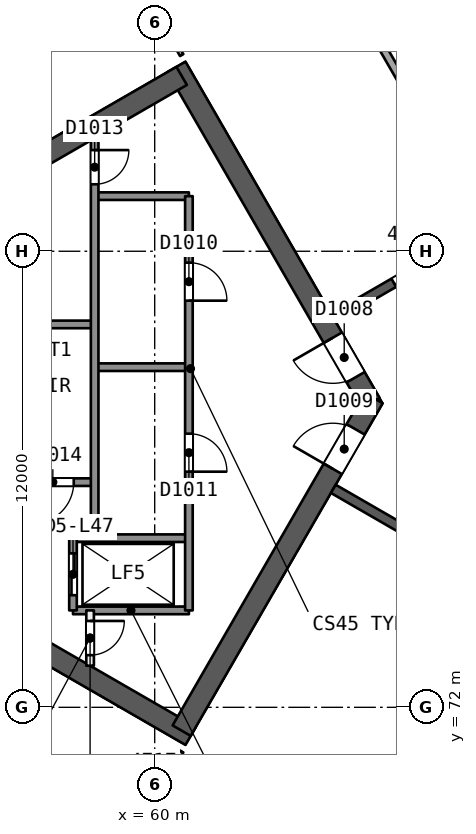
"""IFC4 building model, lengths in metres.
Left out: names, types, materials, properties, quantities, classifications, styles, units other than length and angle.
Written with IfcOpenShell. Run it as: python <this file> out.ifc"""

import sys

from ifc_helpers import new_model, si_unit, direction, frame, frame_2d, origin, place, context, subcontext, project, spatial, rectangle, extrude, element, fill, save


model = new_model("IFC4")
c1 = context("Model", 3, precision=1e-05, world=origin(), true_north=direction((0.0, 1.0)))
c2 = subcontext(c1, "Body", "Model", "MODEL_VIEW")
j1 = project(units=[si_unit("LENGTHUNIT", "METRE"), si_unit("PLANEANGLEUNIT", "RADIAN")], contexts=[c1])
p1 = place(None, origin())
s1 = spatial("IfcSite", under=j1, at=p1, CompositionType="ELEMENT")
p2 = place(p1, origin())
s2 = spatial("IfcBuilding", under=s1, at=p2, CompositionType="ELEMENT")
p3 = place(p2, frame((0.0, 0.0, 193.3)))
s3 = spatial("IfcBuildingStorey", under=s2, at=p3, CompositionType="ELEMENT", Elevation=193.3)
p4 = place(p3, frame((65.682, 80.0, 0.0), z_axis=(0.0, 0.0, 1.0), x_axis=(-0.500000202252, 0.866025287014, 0.0)))
e1 = element("IfcWall", 1, at=p4, inside=s3, PredefinedType="SHEAR", context=c2, shape_type="SweptSolid", body=[
    extrude(rectangle(XDim=10.221, YDim=0.55, at=frame_2d((5.111, 0.0))), origin(), (0.0, 0.0, 1.0), 3.7),
])
p5 = place(p4, frame((0.791, 0.0, 0.0)))
e2 = element("IfcOpeningElement", 2, at=p5, cuts=e1, PredefinedType="OPENING", context=c2, shape_type="SweptSolid", body=[
    extrude(rectangle(XDim=1.2, YDim=2.1, at=frame_2d((0.6, 1.05))), frame((0.0, 0.286, 0.0), z_axis=(0.0, -1.0, 0.0), x_axis=(1.0, 0.0, 0.0)), (0.0, 0.0, 1.0), 0.571),
])
p6 = place(p3, frame((60.709, 88.614, 0.0), z_axis=(0.0, 0.0, 1.0), x_axis=(-0.866020164116, -0.500009075263, 0.0)))
e3 = element("IfcWall", 3, at=p6, inside=s3, PredefinedType="SHEAR", context=c2, shape_type="SweptSolid", body=[
    extrude(rectangle(XDim=14.058, YDim=0.55, at=frame_2d((7.029, 0.0))), origin(), (0.0, 0.0, 1.0), 3.7),
])
p7 = place(p3, frame((48.672, 78.336, 0.0), z_axis=(0.0, 0.0, 1.0), x_axis=(0.866023530946, -0.500003243837, 0.0)))
e4 = element("IfcWall", 4, at=p7, inside=s3, PredefinedType="SHEAR", context=c2, shape_type="SweptSolid", body=[
    extrude(rectangle(XDim=14.175, YDim=0.55, at=frame_2d((7.087, 0.0))), origin(), (0.0, 0.0, 1.0), 3.7),
])
p8 = place(p3, frame((60.709, 71.386, 0.0), z_axis=(0.0, 0.0, 1.0), x_axis=(0.500015938302, 0.866016201606, 0.0)))
e5 = element("IfcWall", 5, at=p8, inside=s3, PredefinedType="SHEAR", context=c2, shape_type="SweptSolid", body=[
    extrude(rectangle(XDim=10.105, YDim=0.55, at=frame_2d((5.053, 0.0))), origin(), (0.0, 0.0, 1.0), 3.7),
])
p9 = place(p8, frame((7.955, 0.0, 0.0)))
e6 = element("IfcOpeningElement", 6, at=p9, cuts=e5, PredefinedType="OPENING", context=c2, shape_type="SweptSolid", body=[
    extrude(rectangle(XDim=1.2, YDim=2.1, at=frame_2d((0.6, 1.05))), frame((0.0, 0.286, 0.0), z_axis=(0.0, -1.0, 0.0), x_axis=(1.0, 0.0, 0.0)), (0.0, 0.0, 1.0), 0.571),
])
p10 = place(p3, frame((78.2, 90.046, 0.0), z_axis=(0.0, 0.0, 1.0), x_axis=(-0.866026492143, -0.499998114903, 0.0)))
e7 = element("IfcWall", 7, at=p10, inside=s3, PredefinedType="SHEAR", context=c2, shape_type="SweptSolid", body=[
    extrude(rectangle(XDim=15.588, YDim=0.25, at=frame_2d((7.794, 0.0))), origin(), (0.0, 0.0, 1.0), 3.3),
])
p11 = place(p10, frame((1.059, 0.0, 0.0)))
e8 = element("IfcOpeningElement", 8, at=p11, cuts=e7, PredefinedType="OPENING", context=c2, shape_type="SweptSolid", body=[
    extrude(rectangle(XDim=1.0, YDim=2.1, at=frame_2d((0.5, 1.05))), frame((0.0, 0.135, 0.0), z_axis=(0.0, -1.0, 0.0), x_axis=(1.0, 0.0, 0.0)), (0.0, 0.0, 1.0), 0.271),
])
p12 = place(p10, frame((4.616, 0.0, 0.0)))
e9 = element("IfcOpeningElement", 9, at=p12, cuts=e7, PredefinedType="OPENING", context=c2, shape_type="SweptSolid", body=[
    extrude(rectangle(XDim=0.9, YDim=2.1, at=frame_2d((0.45, 1.05))), frame((0.0, 0.135, 0.0), z_axis=(0.0, -1.0, 0.0), x_axis=(1.0, 0.0, 0.0)), (0.0, 0.0, 1.0), 0.271),
])
p13 = place(p10, frame((8.513, 0.0, 0.0)))
e10 = element("IfcOpeningElement", 10, at=p13, cuts=e7, PredefinedType="OPENING", context=c2, shape_type="SweptSolid", body=[
    extrude(rectangle(XDim=0.9, YDim=2.1, at=frame_2d((0.45, 1.05))), frame((0.0, 0.135, 0.0), z_axis=(0.0, -1.0, 0.0), x_axis=(1.0, 0.0, 0.0)), (0.0, 0.0, 1.0), 0.271),
])
p14 = place(p10, frame((12.75, 0.0, 0.0)))
e11 = element("IfcOpeningElement", 11, at=p14, cuts=e7, PredefinedType="OPENING", context=c2, shape_type="SweptSolid", body=[
    extrude(rectangle(XDim=1.0, YDim=2.1, at=frame_2d((0.5, 1.05))), frame((0.0, 0.135, 0.0), z_axis=(0.0, -1.0, 0.0), x_axis=(1.0, 0.0, 0.0)), (0.0, 0.0, 1.0), 0.271),
])
p15 = place(p3, frame((64.7, 77.748, 0.0), z_axis=(0.0, 0.0, 1.0), x_axis=(0.866026492143, -0.499998114903, 0.0)))
e12 = element("IfcWall", 12, at=p15, inside=s3, PredefinedType="SHEAR", context=c2, shape_type="SweptSolid", body=[
    extrude(rectangle(XDim=15.588, YDim=0.25, at=frame_2d((7.794, 0.0))), origin(), (0.0, 0.0, 1.0), 3.3),
])
p16 = place(p15, frame((3.007, 0.0, 0.0)))
e13 = element("IfcOpeningElement", 13, at=p16, cuts=e12, PredefinedType="OPENING", context=c2, shape_type="SweptSolid", body=[
    extrude(rectangle(XDim=1.0, YDim=2.1, at=frame_2d((0.5, 1.05))), frame((0.0, 0.135, 0.0), z_axis=(0.0, -1.0, 0.0), x_axis=(1.0, 0.0, 0.0)), (0.0, 0.0, 1.0), 0.271),
])
p17 = place(p15, frame((8.363, 0.0, 0.0)))
e14 = element("IfcOpeningElement", 14, at=p17, cuts=e12, PredefinedType="OPENING", context=c2, shape_type="SweptSolid", body=[
    extrude(rectangle(XDim=1.2, YDim=2.4, at=frame_2d((0.6, 1.2))), frame((0.0, 0.135, 0.0), z_axis=(0.0, -1.0, 0.0), x_axis=(1.0, 0.0, 0.0)), (0.0, 0.0, 1.0), 0.271),
])
p18 = place(p15, frame((12.75, 0.0, 0.0)))
e15 = element("IfcOpeningElement", 15, at=p18, cuts=e12, PredefinedType="OPENING", context=c2, shape_type="SweptSolid", body=[
    extrude(rectangle(XDim=1.0, YDim=2.1, at=frame_2d((0.5, 1.05))), frame((0.0, 0.135, 0.0), z_axis=(0.0, -1.0, 0.0), x_axis=(1.0, 0.0, 0.0)), (0.0, 0.0, 1.0), 0.271),
])
p19 = place(p3, frame((63.273, 94.076, 0.0), z_axis=(0.0, 0.0, 1.0), x_axis=(0.499998338299, -0.866026363166, 0.0)))
e16 = element("IfcWall", 16, at=p19, inside=s3, PredefinedType="PARTITIONING", context=c2, shape_type="SweptSolid", body=[
    extrude(rectangle(XDim=10.954, YDim=0.2, at=frame_2d((5.477, 0.0))), origin(), (0.0, 0.0, 1.0), 3.3),
])
p20 = place(p3, frame((59.223, 91.738, 0.0), z_axis=(0.0, 0.0, 1.0), x_axis=(0.49997816789, -0.866038008192, 0.0)))
e17 = element("IfcWall", 17, at=p20, inside=s3, PredefinedType="PARTITIONING", context=c2, shape_type="SweptSolid", body=[
    extrude(rectangle(XDim=2.975, YDim=0.1, at=frame_2d((1.488, 0.0))), origin(), (0.0, 0.0, 1.0), 3.3),
])
p21 = place(p20, frame((1.038, 0.0, 0.0)))
e18 = element("IfcOpeningElement", 18, at=p21, cuts=e17, PredefinedType="OPENING", context=c2, shape_type="SweptSolid", body=[
    extrude(rectangle(XDim=0.9, YDim=2.1, at=frame_2d((0.45, 1.05))), frame((0.0, 0.061, 0.0), z_axis=(0.0, -1.0, 0.0), x_axis=(1.0, 0.0, 0.0)), (0.0, 0.0, 1.0), 0.121),
])
p22 = place(p3, frame((60.71, 70.838, 0.0), z_axis=(0.0, 0.0, 1.0), x_axis=(-0.49997816789, -0.866038008192, 0.0)))
e19 = element("IfcWall", 19, at=p22, inside=s3, PredefinedType="PARTITIONING", context=c2, shape_type="SweptSolid", body=[
    extrude(rectangle(XDim=2.975, YDim=0.1, at=frame_2d((1.488, 0.0))), origin(), (0.0, 0.0, 1.0), 3.3),
])
p23 = place(p22, frame((1.038, 0.0, 0.0)))
e20 = element("IfcOpeningElement", 20, at=p23, cuts=e19, PredefinedType="OPENING", context=c2, shape_type="SweptSolid", body=[
    extrude(rectangle(XDim=0.9, YDim=2.1, at=frame_2d((0.45, 1.05))), frame((0.0, 0.061, 0.0), z_axis=(0.0, -1.0, 0.0), x_axis=(1.0, 0.0, 0.0)), (0.0, 0.0, 1.0), 0.121),
])
p24 = place(p3, frame((65.298, 64.754, 0.0), z_axis=(0.0, 0.0, 1.0), x_axis=(0.499998338299, 0.866026363166, 0.0)))
e21 = element("IfcWall", 21, at=p24, inside=s3, PredefinedType="PARTITIONING", context=c2, shape_type="SweptSolid", body=[
    extrude(rectangle(XDim=10.954, YDim=0.2, at=frame_2d((5.477, 0.0))), origin(), (0.0, 0.0, 1.0), 3.3),
])
p25 = place(p3, frame((43.232, 82.678, 0.0), z_axis=(0.0, 0.0, 1.0), x_axis=(0.866025125259, 0.500000482419, 0.0)))
e22 = element("IfcWall", 22, at=p25, inside=s3, PredefinedType="SOLIDWALL", context=c2, shape_type="SweptSolid", body=[
    extrude(rectangle(XDim=52.347, YDim=0.3, at=frame_2d((26.173, 0.0))), origin(), (0.0, 0.0, 1.0), 3.3),
])
p26 = place(p25, frame((31.209, 0.0, 0.0)))
e23 = element("IfcOpeningElement", 23, at=p26, cuts=e22, PredefinedType="OPENING", context=c2, shape_type="SweptSolid", body=[
    extrude(rectangle(XDim=2.4, YDim=2.4, at=frame_2d((1.2, 1.2))), frame((0.0, 0.161, 0.0), z_axis=(0.0, -1.0, 0.0), x_axis=(1.0, 0.0, 0.0)), (0.0, 0.0, 1.0), 0.321),
])
p27 = place(p25, frame((40.7, 0.0, 0.0)))
e24 = element("IfcOpeningElement", 24, at=p27, cuts=e22, PredefinedType="OPENING", context=c2, shape_type="SweptSolid", body=[
    extrude(rectangle(XDim=2.4, YDim=2.4, at=frame_2d((1.2, 1.2))), frame((0.0, 0.161, 0.0), z_axis=(0.0, -1.0, 0.0), x_axis=(1.0, 0.0, 0.0)), (0.0, 0.0, 1.0), 0.321),
])
p28 = place(p25, frame((19.517, 0.0, 0.0)))
e25 = element("IfcOpeningElement", 25, at=p28, cuts=e22, PredefinedType="OPENING", context=c2, shape_type="SweptSolid", body=[
    extrude(rectangle(XDim=2.4, YDim=2.4, at=frame_2d((1.2, 1.2))), frame((0.0, 0.161, 0.0), z_axis=(0.0, -1.0, 0.0), x_axis=(1.0, 0.0, 0.0)), (0.0, 0.0, 1.0), 0.321),
])
p29 = place(p25, frame((9.27, 0.0, 0.0)))
e26 = element("IfcOpeningElement", 26, at=p29, cuts=e22, PredefinedType="OPENING", context=c2, shape_type="SweptSolid", body=[
    extrude(rectangle(XDim=2.4, YDim=2.4, at=frame_2d((1.2, 1.2))), frame((0.0, 0.161, 0.0), z_axis=(0.0, -1.0, 0.0), x_axis=(1.0, 0.0, 0.0)), (0.0, 0.0, 1.0), 0.321),
])
p30 = place(p25, frame((28.001, 0.0, 0.9)))
e27 = element("IfcOpeningElement", 27, at=p30, cuts=e22, PredefinedType="OPENING", context=c2, shape_type="SweptSolid", body=[
    extrude(rectangle(XDim=1.8, YDim=1.5, at=frame_2d((0.9, 0.75))), frame((0.0, 0.161, 0.0), z_axis=(0.0, -1.0, 0.0), x_axis=(1.0, 0.0, 0.0)), (0.0, 0.0, 1.0), 0.321),
])
p31 = place(p25, frame((24.104, 0.0, 0.9)))
e28 = element("IfcOpeningElement", 28, at=p31, cuts=e22, PredefinedType="OPENING", context=c2, shape_type="SweptSolid", body=[
    extrude(rectangle(XDim=1.8, YDim=1.5, at=frame_2d((0.9, 0.75))), frame((0.0, 0.161, 0.0), z_axis=(0.0, -1.0, 0.0), x_axis=(1.0, 0.0, 0.0)), (0.0, 0.0, 1.0), 0.321),
])
p32 = place(p3, frame((88.565, 51.149, 0.0), z_axis=(0.0, 0.0, 1.0), x_axis=(-0.866025125259, 0.500000482419, 0.0)))
e29 = element("IfcWall", 29, at=p32, inside=s3, PredefinedType="SOLIDWALL", context=c2, shape_type="SweptSolid", body=[
    extrude(rectangle(XDim=52.347, YDim=0.3, at=frame_2d((26.173, 0.0))), origin(), (0.0, 0.0, 1.0), 3.3),
])
p33 = place(p32, frame((29.26, 0.0, 0.0)))
e30 = element("IfcOpeningElement", 30, at=p33, cuts=e29, PredefinedType="OPENING", context=c2, shape_type="SweptSolid", body=[
    extrude(rectangle(XDim=2.4, YDim=2.4, at=frame_2d((1.2, 1.2))), frame((0.0, 0.161, 0.0), z_axis=(0.0, -1.0, 0.0), x_axis=(1.0, 0.0, 0.0)), (0.0, 0.0, 1.0), 0.321),
])
p34 = place(p32, frame((40.7, 0.0, 0.0)))
e31 = element("IfcOpeningElement", 31, at=p34, cuts=e29, PredefinedType="OPENING", context=c2, shape_type="SweptSolid", body=[
    extrude(rectangle(XDim=2.4, YDim=2.4, at=frame_2d((1.2, 1.2))), frame((0.0, 0.161, 0.0), z_axis=(0.0, -1.0, 0.0), x_axis=(1.0, 0.0, 0.0)), (0.0, 0.0, 1.0), 0.321),
])
p35 = place(p32, frame((19.517, 0.0, 0.0)))
e32 = element("IfcOpeningElement", 32, at=p35, cuts=e29, PredefinedType="OPENING", context=c2, shape_type="SweptSolid", body=[
    extrude(rectangle(XDim=2.4, YDim=2.4, at=frame_2d((1.2, 1.2))), frame((0.0, 0.161, 0.0), z_axis=(0.0, -1.0, 0.0), x_axis=(1.0, 0.0, 0.0)), (0.0, 0.0, 1.0), 0.321),
])
p36 = place(p32, frame((9.27, 0.0, 0.0)))
e33 = element("IfcOpeningElement", 33, at=p36, cuts=e29, PredefinedType="OPENING", context=c2, shape_type="SweptSolid", body=[
    extrude(rectangle(XDim=2.4, YDim=2.4, at=frame_2d((1.2, 1.2))), frame((0.0, 0.161, 0.0), z_axis=(0.0, -1.0, 0.0), x_axis=(1.0, 0.0, 0.0)), (0.0, 0.0, 1.0), 0.321),
])
p37 = place(p32, frame((24.104, 0.0, 0.9)))
e34 = element("IfcOpeningElement", 34, at=p37, cuts=e29, PredefinedType="OPENING", context=c2, shape_type="SweptSolid", body=[
    extrude(rectangle(XDim=1.8, YDim=1.5, at=frame_2d((0.9, 0.75))), frame((0.0, 0.161, 0.0), z_axis=(0.0, -1.0, 0.0), x_axis=(1.0, 0.0, 0.0)), (0.0, 0.0, 1.0), 0.321),
])
p38 = place(p3, frame((60.9, 85.45, 0.0), z_axis=(0.0, 0.0, 1.0), x_axis=(-1.0, 0.0, 0.0)))
e35 = element("IfcWall", 35, at=p38, inside=s3, PredefinedType="SOLIDWALL", context=c2, shape_type="SweptSolid", body=[
    extrude(rectangle(XDim=2.48, YDim=0.2, at=frame_2d((1.24, 0.0))), origin(), (0.0, 0.0, 1.0), 3.3),
])
p39 = place(p3, frame((58.42, 82.075, 0.0), z_axis=(0.0, 0.0, 1.0), x_axis=(-1.0, 0.0, 0.0)))
e36 = element("IfcWall", 36, at=p39, inside=s3, PredefinedType="SOLIDWALL", context=c2, shape_type="SweptSolid", body=[
    extrude(rectangle(XDim=7.7, YDim=0.2, at=frame_2d((3.85, 0.0))), origin(), (0.0, 0.0, 1.0), 3.3),
])
p40 = place(p3, frame((60.9, 80.95, 0.0), z_axis=(0.0, 0.0, 1.0), x_axis=(-1.0, 0.0, 0.0)))
e37 = element("IfcWall", 37, at=p40, inside=s3, PredefinedType="SOLIDWALL", context=c2, shape_type="SweptSolid", body=[
    extrude(rectangle(XDim=2.48, YDim=0.2, at=frame_2d((1.24, 0.0))), origin(), (0.0, 0.0, 1.0), 3.3),
])
p41 = place(p3, frame((58.42, 77.925, 0.0), z_axis=(0.0, 0.0, 1.0), x_axis=(-1.0, 0.0, 0.0)))
e38 = element("IfcWall", 38, at=p41, inside=s3, PredefinedType="SOLIDWALL", context=c2, shape_type="SweptSolid", body=[
    extrude(rectangle(XDim=7.7, YDim=0.2, at=frame_2d((3.85, 0.0))), origin(), (0.0, 0.0, 1.0), 3.3),
])
p42 = place(p41, frame((0.55, 0.0, 0.0)))
e39 = element("IfcOpeningElement", 39, at=p42, cuts=e38, PredefinedType="OPENING", context=c2, shape_type="SweptSolid", body=[
    extrude(rectangle(XDim=1.1, YDim=2.1, at=frame_2d((0.55, 1.05))), frame((0.0, 0.11, 0.0), z_axis=(0.0, -1.0, 0.0), x_axis=(1.0, 0.0, 0.0)), (0.0, 0.0, 1.0), 0.221),
])
for number, where, z_axis, x_axis in (
    (40, (60.9, 76.45, 0.0), (0.0, 0.0, 1.0), (-1.0, 0.0, 0.0)),
    (41, (60.9, 74.55, 0.0), (0.0, 0.0, 1.0), (-1.0, 0.0, 0.0)),
):
    element("IfcWall", number, at=place(p3, frame(where, z_axis=z_axis, x_axis=x_axis)), inside=s3, PredefinedType="SOLIDWALL", context=c2, shape_type="SweptSolid", body=[
        extrude(rectangle(XDim=3.05, YDim=0.2, at=frame_2d((1.525, 0.0))), origin(), (0.0, 0.0, 1.0), 3.3),
    ])
p43 = place(p3, frame((60.9, 85.45, 0.0), z_axis=(0.0, 0.0, 1.0), x_axis=(0.0, -1.0, 0.0)))
e42 = element("IfcWall", 42, at=p43, inside=s3, PredefinedType="SOLIDWALL", context=c2, shape_type="SweptSolid", body=[
    extrude(rectangle(XDim=10.9, YDim=0.2, at=frame_2d((5.45, 0.0))), origin(), (0.0, 0.0, 1.0), 3.3),
])
p44 = place(p43, frame((1.75, 0.0, 0.0)))
e43 = element("IfcOpeningElement", 43, at=p44, cuts=e42, PredefinedType="OPENING", context=c2, shape_type="SweptSolid", body=[
    extrude(rectangle(XDim=1.0, YDim=2.1, at=frame_2d((0.5, 1.05))), frame((0.0, 0.11, 0.0), z_axis=(0.0, -1.0, 0.0), x_axis=(1.0, 0.0, 0.0)), (0.0, 0.0, 1.0), 0.221),
])
p45 = place(p43, frame((6.25, 0.0, 0.0)))
e44 = element("IfcOpeningElement", 44, at=p45, cuts=e42, PredefinedType="OPENING", context=c2, shape_type="SweptSolid", body=[
    extrude(rectangle(XDim=1.0, YDim=2.1, at=frame_2d((0.5, 1.05))), frame((0.0, 0.11, 0.0), z_axis=(0.0, -1.0, 0.0), x_axis=(1.0, 0.0, 0.0)), (0.0, 0.0, 1.0), 0.221),
])
p46 = place(p3, frame((58.42, 86.974, 0.0), z_axis=(0.0, 0.0, 1.0), x_axis=(0.0, -1.0, 0.0)))
e45 = element("IfcWall", 45, at=p46, inside=s3, PredefinedType="SOLIDWALL", context=c2, shape_type="SweptSolid", body=[
    extrude(rectangle(XDim=10.524, YDim=0.2, at=frame_2d((5.262, 0.0))), origin(), (0.0, 0.0, 1.0), 3.3),
])
p47 = place(p46, frame((0.312, 0.0, 0.0)))
e46 = element("IfcOpeningElement", 46, at=p47, cuts=e45, PredefinedType="OPENING", context=c2, shape_type="SweptSolid", body=[
    extrude(rectangle(XDim=0.9, YDim=2.1, at=frame_2d((0.45, 1.05))), frame((0.0, 0.11, 0.0), z_axis=(0.0, -1.0, 0.0), x_axis=(1.0, 0.0, 0.0)), (0.0, 0.0, 1.0), 0.221),
])
p48 = place(p3, frame((58.3, 74.55, 0.0), z_axis=(0.0, 0.0, 1.0), x_axis=(0.0, -1.0, 0.0)))
e47 = element("IfcWall", 47, at=p48, inside=s3, PredefinedType="PARTITIONING", context=c2, shape_type="SweptSolid", body=[
    extrude(rectangle(XDim=1.455, YDim=0.2, at=frame_2d((0.728, 0.0))), origin(), (0.0, 0.0, 1.0), 3.3),
])
p49 = place(p48, frame((0.278, 0.0, 0.0)))
e48 = element("IfcOpeningElement", 48, at=p49, cuts=e47, PredefinedType="OPENING", context=c2, shape_type="SweptSolid", body=[
    extrude(rectangle(XDim=0.9, YDim=2.1, at=frame_2d((0.45, 1.05))), frame((0.0, 0.11, 0.0), z_axis=(0.0, -1.0, 0.0), x_axis=(1.0, 0.0, 0.0)), (0.0, 0.0, 1.0), 0.221),
])
p50 = place(p3, frame((57.85, 76.45, 0.0), z_axis=(0.0, 0.0, 1.0), x_axis=(0.0, -1.0, 0.0)))
e49 = element("IfcWall", 49, at=p50, inside=s3, PredefinedType="SOLIDWALL", context=c2, shape_type="SweptSolid", body=[
    extrude(rectangle(XDim=1.9, YDim=0.2, at=frame_2d((0.95, 0.0))), origin(), (0.0, 0.0, 1.0), 3.3),
])
p51 = place(p50, frame((0.4, 0.0, 0.0)))
e50 = element("IfcOpeningElement", 50, at=p51, cuts=e49, PredefinedType="OPENING", context=c2, shape_type="SweptSolid", body=[
    extrude(rectangle(XDim=1.1, YDim=2.1, at=frame_2d((0.55, 1.05))), frame((0.0, 0.11, 0.0), z_axis=(0.0, -1.0, 0.0), x_axis=(1.0, 0.0, 0.0)), (0.0, 0.0, 1.0), 0.221),
])
p52 = place(p14, origin())
e51 = element("IfcDoor", 51, at=p52, inside=s3, OperationType="SINGLE_SWING_RIGHT", PredefinedType="NOTDEFINED", context=c2, shape_type="SweptSolid", body=[
    extrude(rectangle(XDim=1.0, YDim=2.1, at=frame_2d((0.5, 1.05))), frame((0.0, 0.025, 0.0), z_axis=(0.0, -1.0, 0.0), x_axis=(1.0, 0.0, 0.0)), (0.0, 0.0, 1.0), 0.05),
])
fill(e11, e51)
p53 = place(p5, origin())
e52 = element("IfcDoor", 52, at=p53, inside=s3, OperationType="SINGLE_SWING_RIGHT", PredefinedType="NOTDEFINED", context=c2, shape_type="SweptSolid", body=[
    extrude(rectangle(XDim=1.2, YDim=2.1, at=frame_2d((0.6, 1.05))), frame((0.0, 0.025, 0.0), z_axis=(0.0, -1.0, 0.0), x_axis=(1.0, 0.0, 0.0)), (0.0, 0.0, 1.0), 0.05),
])
fill(e2, e52)
p54 = place(p9, origin())
e53 = element("IfcDoor", 53, at=p54, inside=s3, OperationType="SINGLE_SWING_LEFT", PredefinedType="NOTDEFINED", context=c2, shape_type="SweptSolid", body=[
    extrude(rectangle(XDim=1.2, YDim=2.1, at=frame_2d((0.6, 1.05))), frame((0.0, 0.025, 0.0), z_axis=(0.0, -1.0, 0.0), x_axis=(1.0, 0.0, 0.0)), (0.0, 0.0, 1.0), 0.05),
])
fill(e6, e53)
p55 = place(p51, origin())
e54 = element("IfcDoor", 54, at=p55, inside=s3, OperationType="SLIDING_TO_RIGHT", PredefinedType="NOTDEFINED", context=c2, shape_type="SweptSolid", body=[
    extrude(rectangle(XDim=1.1, YDim=2.1, at=frame_2d((0.55, 1.05))), frame((0.0, 0.025, 0.0), z_axis=(0.0, -1.0, 0.0), x_axis=(1.0, 0.0, 0.0)), (0.0, 0.0, 1.0), 0.05),
])
fill(e50, e54)
p56 = place(p44, origin())
e55 = element("IfcDoor", 55, at=p56, inside=s3, OperationType="SINGLE_SWING_RIGHT", PredefinedType="NOTDEFINED", context=c2, shape_type="SweptSolid", body=[
    extrude(rectangle(XDim=1.0, YDim=2.1, at=frame_2d((0.5, 1.05))), frame((0.0, 0.025, 0.0), z_axis=(0.0, -1.0, 0.0), x_axis=(1.0, 0.0, 0.0)), (0.0, 0.0, 1.0), 0.05),
])
fill(e43, e55)
p57 = place(p45, origin())
e56 = element("IfcDoor", 56, at=p57, inside=s3, OperationType="SINGLE_SWING_RIGHT", PredefinedType="NOTDEFINED", context=c2, shape_type="SweptSolid", body=[
    extrude(rectangle(XDim=1.0, YDim=2.1, at=frame_2d((0.5, 1.05))), frame((0.0, 0.025, 0.0), z_axis=(0.0, -1.0, 0.0), x_axis=(1.0, 0.0, 0.0)), (0.0, 0.0, 1.0), 0.05),
])
fill(e44, e56)
p58 = place(p49, origin())
e57 = element("IfcDoor", 57, at=p58, inside=s3, OperationType="SINGLE_SWING_LEFT", PredefinedType="NOTDEFINED", context=c2, shape_type="SweptSolid", body=[
    extrude(rectangle(XDim=0.9, YDim=2.1, at=frame_2d((0.45, 1.05))), frame((0.0, 0.025, 0.0), z_axis=(0.0, -1.0, 0.0), x_axis=(1.0, 0.0, 0.0)), (0.0, 0.0, 1.0), 0.05),
])
fill(e48, e57)
p59 = place(p47, origin())
e58 = element("IfcDoor", 58, at=p59, inside=s3, OperationType="SINGLE_SWING_LEFT", PredefinedType="NOTDEFINED", context=c2, shape_type="SweptSolid", body=[
    extrude(rectangle(XDim=0.9, YDim=2.1, at=frame_2d((0.45, 1.05))), frame((0.0, 0.025, 0.0), z_axis=(0.0, -1.0, 0.0), x_axis=(1.0, 0.0, 0.0)), (0.0, 0.0, 1.0), 0.05),
])
fill(e46, e58)
p60 = place(p42, origin())
e59 = element("IfcDoor", 59, at=p60, inside=s3, OperationType="SINGLE_SWING_RIGHT", PredefinedType="NOTDEFINED", context=c2, shape_type="SweptSolid", body=[
    extrude(rectangle(XDim=1.1, YDim=2.1, at=frame_2d((0.55, 1.05))), frame((0.0, 0.025, 0.0), z_axis=(0.0, -1.0, 0.0), x_axis=(1.0, 0.0, 0.0)), (0.0, 0.0, 1.0), 0.05),
])
fill(e39, e59)
save(model, sys.argv[1])
